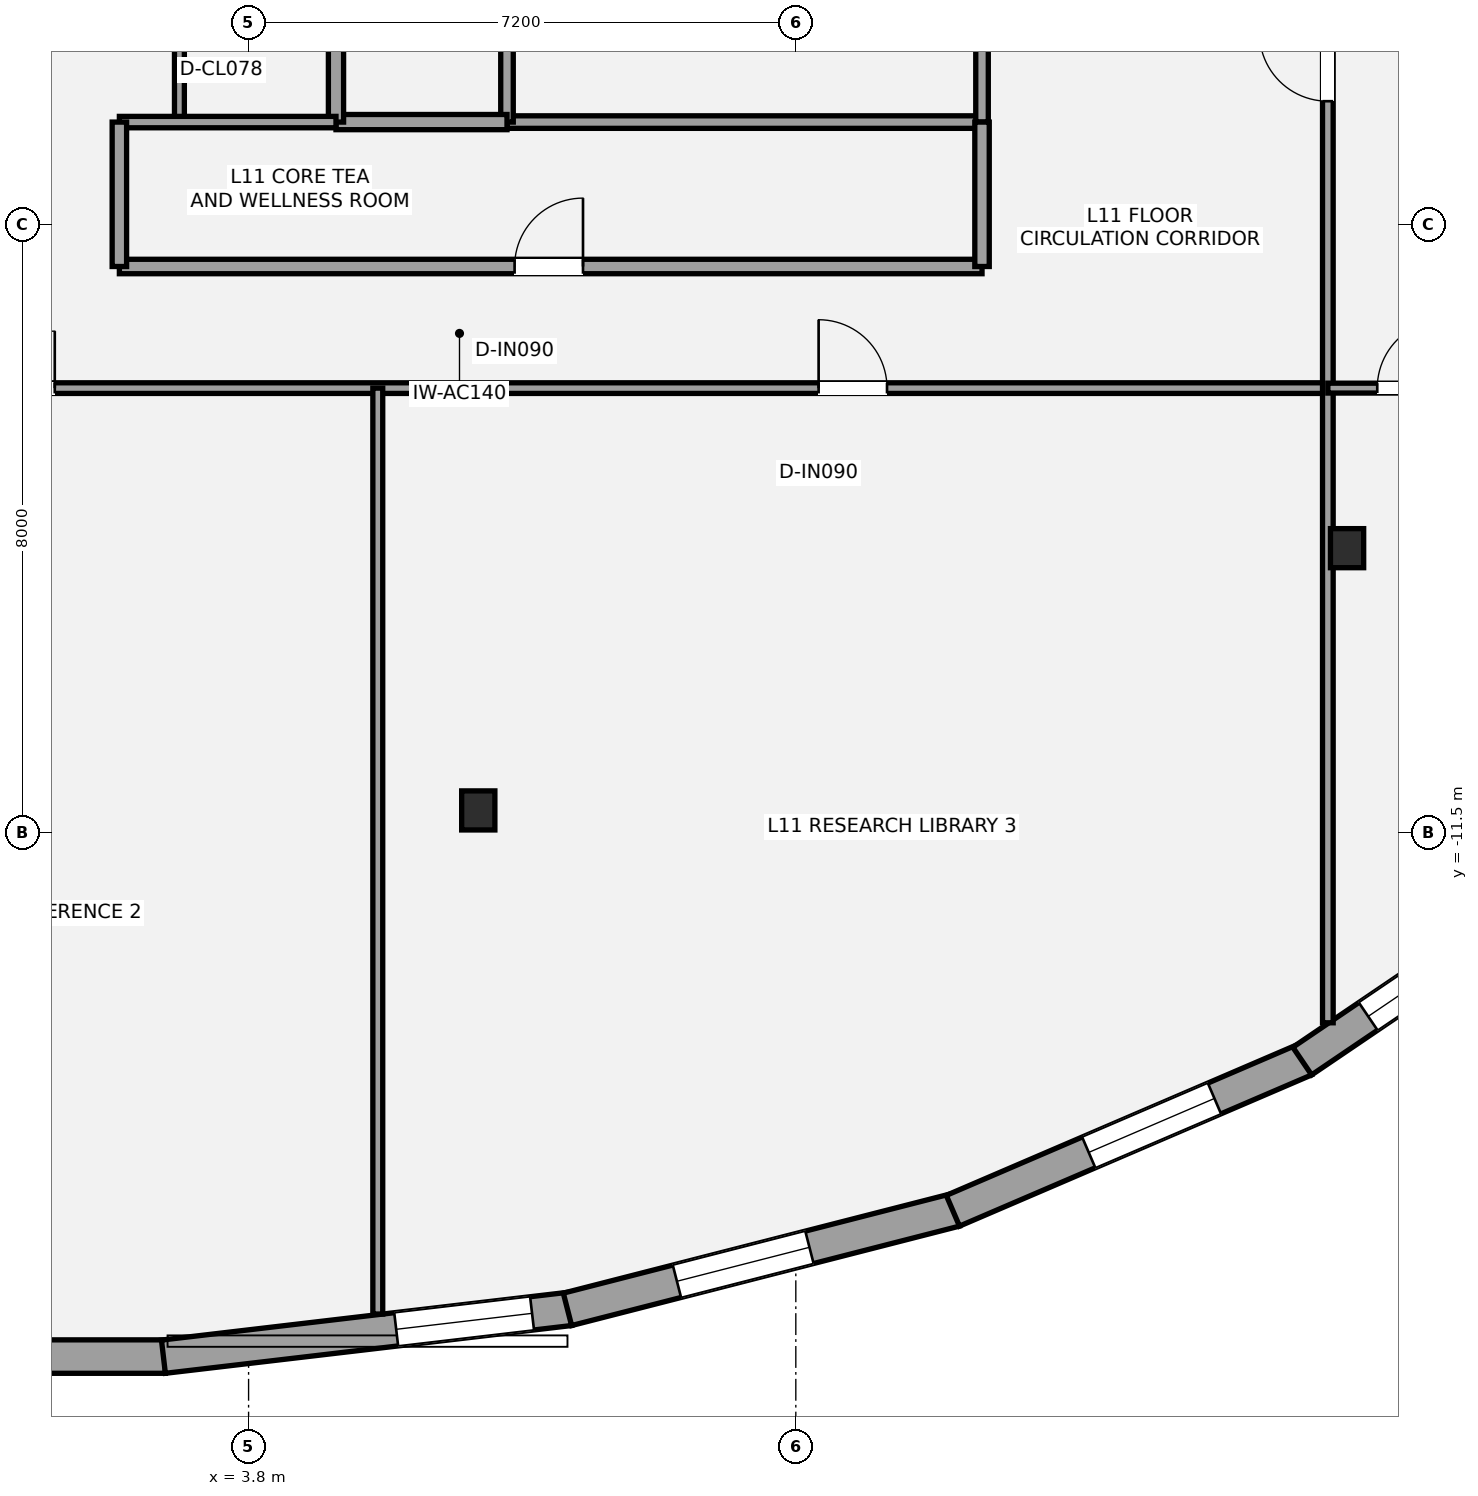
"""IFC4 building model, lengths in metres.
Left out: names, types, materials, properties, quantities, classifications, styles, units other than length and angle.
Written with IfcOpenShell. Run it as: python <this file> out.ifc"""

import sys

from ifc_helpers import new_model, si_unit, direction, frame, frame_2d, origin, origin_2d, place, context, subcontext, project, spatial, rectangle, i_section, extrude, element, fill, save


model = new_model("IFC4")
c1 = context("Model", 3, precision=1e-05, world=origin(), true_north=direction((0.0, 1.0)))
c2 = subcontext(c1, "Body", "Model", "MODEL_VIEW")
j1 = project(units=[si_unit("LENGTHUNIT", "METRE"), si_unit("PLANEANGLEUNIT", "RADIAN")], contexts=[c1])
p1 = place(None, origin())
s1 = spatial("IfcSite", under=j1, at=p1, CompositionType="ELEMENT")
p2 = place(p1, origin())
s2 = spatial("IfcBuilding", under=s1, at=p2, CompositionType="ELEMENT")
p3 = place(p2, frame((0.0, 0.0, 45.0)))
s3 = spatial("IfcBuildingStorey", under=s2, at=p3, CompositionType="ELEMENT", Elevation=45.0)
for number, where, z_axis, x_axis in (
    (1, (6.822, -11.206, 0.0), (0.0, 0.0, 1.0), (1.0, 0.0, 0.0)),
    (2, (18.253, -7.756, 0.0), (0.0, 0.0, 1.0), (1.0, 0.0, 0.0)),
):
    element("IfcColumn", number, at=place(p3, frame(where, z_axis=z_axis, x_axis=x_axis)), inside=s3, PredefinedType="COLUMN", context=c2, shape_type="SweptSolid", body=[
        extrude(i_section(OverallWidth=0.437, OverallDepth=0.514, WebThickness=0.061, FlangeThickness=0.097, at=origin_2d()), origin(), (0.0, 0.0, 1.0), 3.6),
    ])
p4 = place(p3, frame((2.705, -18.391, 0.0), z_axis=(0.0, 0.0, 1.0), x_axis=(-1.0, 0.0, 0.0)))
e3 = element("IfcWall", 3, at=p4, inside=s3, PredefinedType="STANDARD", context=c2, shape_type="SweptSolid", body=[
    extrude(rectangle(XDim=5.41, YDim=0.44, at=frame_2d((2.705, 0.0))), origin(), (0.0, 0.0, 1.0), 2.529),
])
p5 = place(p4, frame((2.028, 0.0, 0.65)))
e4 = element("IfcOpeningElement", 4, at=p5, cuts=e3, PredefinedType="OPENING", context=c2, shape_type="SweptSolid", body=[
    extrude(rectangle(XDim=1.8, YDim=1.7, at=frame_2d((0.9, 0.85))), frame((0.0, 0.23, 0.0), z_axis=(0.0, -1.0, 0.0), x_axis=(1.0, 0.0, 0.0)), (0.0, 0.0, 1.0), 0.46),
])
p6 = place(p3, frame((8.025, -17.764, 0.0), z_axis=(0.0, 0.0, 1.0), x_axis=(-0.993159890371, -0.116762289112, 0.0)))
e5 = element("IfcWall", 5, at=p6, inside=s3, PredefinedType="STANDARD", context=c2, shape_type="SweptSolid", body=[
    extrude(rectangle(XDim=5.382, YDim=0.44, at=frame_2d((2.691, 0.0))), origin(), (0.0, 0.0, 1.0), 2.529),
])
p7 = place(p6, frame((0.498, 0.0, 0.65)))
e6 = element("IfcOpeningElement", 6, at=p7, cuts=e5, PredefinedType="OPENING", context=c2, shape_type="SweptSolid", body=[
    extrude(rectangle(XDim=1.8, YDim=1.7, at=frame_2d((0.9, 0.85))), frame((0.0, 0.23, 0.0), z_axis=(0.0, -1.0, 0.0), x_axis=(1.0, 0.0, 0.0)), (0.0, 0.0, 1.0), 0.46),
])
p8 = place(p3, frame((13.099, -16.462, 0.0), z_axis=(0.0, 0.0, 1.0), x_axis=(-0.968705592422, -0.248212560542, 0.0)))
e7 = element("IfcWall", 7, at=p8, inside=s3, PredefinedType="STANDARD", context=c2, shape_type="SweptSolid", body=[
    extrude(rectangle(XDim=5.268, YDim=0.44, at=frame_2d((2.634, 0.0))), origin(), (0.0, 0.0, 1.0), 2.529),
])
p9 = place(p8, frame((1.981, 0.0, 0.65)))
e8 = element("IfcOpeningElement", 8, at=p9, cuts=e7, PredefinedType="OPENING", context=c2, shape_type="SweptSolid", body=[
    extrude(rectangle(XDim=1.8, YDim=1.7, at=frame_2d((0.9, 0.85))), frame((0.0, 0.23, 0.0), z_axis=(0.0, -1.0, 0.0), x_axis=(1.0, 0.0, 0.0)), (0.0, 0.0, 1.0), 0.46),
])
p10 = place(p3, frame((17.7, -14.483, 0.0), z_axis=(0.0, 0.0, 1.0), x_axis=(-0.918881850071, -0.394532819433, 0.0)))
e9 = element("IfcWall", 9, at=p10, inside=s3, PredefinedType="STANDARD", context=c2, shape_type="SweptSolid", body=[
    extrude(rectangle(XDim=5.042, YDim=0.44, at=frame_2d((2.521, 0.0))), origin(), (0.0, 0.0, 1.0), 2.529),
])
p11 = place(p10, frame((1.297, 0.0, 0.65)))
e10 = element("IfcOpeningElement", 10, at=p11, cuts=e9, PredefinedType="OPENING", context=c2, shape_type="SweptSolid", body=[
    extrude(rectangle(XDim=1.8, YDim=1.7, at=frame_2d((0.9, 0.85))), frame((0.0, 0.23, 0.0), z_axis=(0.0, -1.0, 0.0), x_axis=(1.0, 0.0, 0.0)), (0.0, 0.0, 1.0), 0.46),
])
p12 = place(p3, frame((21.549, -11.87, 0.0), z_axis=(0.0, 0.0, 1.0), x_axis=(-0.827825981515, -0.560984976919, 0.0)))
e11 = element("IfcWall", 11, at=p12, inside=s3, PredefinedType="STANDARD", context=c2, shape_type="SweptSolid", body=[
    extrude(rectangle(XDim=4.695, YDim=0.44, at=frame_2d((2.347, 0.0))), origin(), (0.0, 0.0, 1.0), 2.529),
])
p13 = place(p12, frame((1.846, 0.0, 0.65)))
e12 = element("IfcOpeningElement", 12, at=p13, cuts=e11, PredefinedType="OPENING", context=c2, shape_type="SweptSolid", body=[
    extrude(rectangle(XDim=1.8, YDim=1.7, at=frame_2d((0.9, 0.85))), frame((0.0, 0.23, 0.0), z_axis=(0.0, -1.0, 0.0), x_axis=(1.0, 0.0, 0.0)), (0.0, 0.0, 1.0), 0.46),
])
p14 = place(p3, frame((7.2, -2.15, 0.0), z_axis=(0.0, 0.0, 1.0), x_axis=(1.0, 0.0, 0.0)))
e13 = element("IfcWall", 13, at=p14, inside=s3, PredefinedType="PARTITIONING", context=c2, shape_type="SweptSolid", body=[
    extrude(rectangle(XDim=6.25, YDim=0.165, at=frame_2d((3.125, 0.0))), origin(), (0.0, 0.0, 1.0), 3.4),
])
p15 = place(p3, frame((7.2, -2.15, 0.0), z_axis=(0.0, 0.0, 1.0), x_axis=(0.0, 1.0, 0.0)))
e14 = element("IfcWall", 14, at=p15, inside=s3, PredefinedType="PARTITIONING", context=c2, shape_type="SweptSolid", body=[
    extrude(rectangle(XDim=3.15, YDim=0.165, at=frame_2d((1.575, 0.0))), origin(), (0.0, 0.0, 1.0), 2.853),
])
p16 = place(p3, frame((13.45, -2.15, 0.0), z_axis=(0.0, 0.0, 1.0), x_axis=(0.0, 1.0, 0.0)))
e15 = element("IfcWall", 15, at=p16, inside=s3, PredefinedType="PARTITIONING", context=c2, shape_type="SweptSolid", body=[
    extrude(rectangle(XDim=3.15, YDim=0.165, at=frame_2d((1.575, 0.0))), origin(), (0.0, 0.0, 1.0), 2.853),
])
p17 = place(p16, frame((1.15, 0.0, 0.0)))
e16 = element("IfcOpeningElement", 16, at=p17, cuts=e15, PredefinedType="OPENING", context=c2, shape_type="SweptSolid", body=[
    extrude(rectangle(XDim=1.05, YDim=2.15, at=frame_2d((0.525, 1.075))), frame((0.0, 0.093, 0.0), z_axis=(0.0, -1.0, 0.0), x_axis=(1.0, 0.0, 0.0)), (0.0, 0.0, 1.0), 0.185),
])
p18 = place(p3, frame((4.95, -2.15, 0.0), z_axis=(0.0, 0.0, 1.0), x_axis=(1.0, 0.0, 0.0)))
e17 = element("IfcWall", 17, at=p18, inside=s3, PredefinedType="SOLIDWALL", context=c2, shape_type="SweptSolid", body=[
    extrude(rectangle(XDim=2.25, YDim=0.2, at=frame_2d((1.125, 0.0))), origin(), (0.0, 0.0, 1.0), 3.4),
])
p19 = place(p3, frame((4.95, -2.15, 0.0), z_axis=(0.0, 0.0, 1.0), x_axis=(0.0, 1.0, 0.0)))
e18 = element("IfcWall", 18, at=p19, inside=s3, PredefinedType="SOLIDWALL", context=c2, shape_type="SweptSolid", body=[
    extrude(rectangle(XDim=3.15, YDim=0.2, at=frame_2d((1.575, 0.0))), origin(), (0.0, 0.0, 1.0), 3.4),
])
p20 = place(p19, frame((0.95, 0.0, 0.0)))
e19 = element("IfcOpeningElement", 19, at=p20, cuts=e18, PredefinedType="OPENING", context=c2, shape_type="SweptSolid", body=[
    extrude(rectangle(XDim=0.75, YDim=2.1, at=frame_2d((0.375, 1.05))), frame((0.0, 0.11, 0.0), z_axis=(0.0, -1.0, 0.0), x_axis=(1.0, 0.0, 0.0)), (0.0, 0.0, 1.0), 0.22),
])
p21 = place(p3, frame((2.89, -2.15, 0.0), z_axis=(0.0, 0.0, 1.0), x_axis=(0.0, 1.0, 0.0)))
e20 = element("IfcWall", 20, at=p21, inside=s3, PredefinedType="PARTITIONING", context=c2, shape_type="SweptSolid", body=[
    extrude(rectangle(XDim=1.8, YDim=0.13, at=frame_2d((0.9, 0.0))), origin(), (0.0, 0.0, 1.0), 3.4),
])
p22 = place(p3, frame((2.1, -4.05, 0.0), z_axis=(0.0, 0.0, 1.0), x_axis=(1.0, 0.0, 0.0)))
e21 = element("IfcWall", 21, at=p22, inside=s3, PredefinedType="PLUMBINGWALL", context=c2, shape_type="SweptSolid", body=[
    extrude(rectangle(XDim=11.35, YDim=0.19, at=frame_2d((5.675, 0.0))), origin(), (0.0, 0.0, 1.0), 2.933),
])
p23 = place(p22, frame((5.2, 0.0, 0.0)))
e22 = element("IfcOpeningElement", 22, at=p23, cuts=e21, PredefinedType="OPENING", context=c2, shape_type="SweptSolid", body=[
    extrude(rectangle(XDim=0.9, YDim=2.1, at=frame_2d((0.45, 1.05))), frame((0.0, 0.105, 0.0), z_axis=(0.0, -1.0, 0.0), x_axis=(1.0, 0.0, 0.0)), (0.0, 0.0, 1.0), 0.21),
])
p24 = place(p3, frame((2.1, -2.15, 0.0), z_axis=(0.0, 0.0, 1.0), x_axis=(1.0, 0.0, 0.0)))
e23 = element("IfcWall", 23, at=p24, inside=s3, PredefinedType="PLUMBINGWALL", context=c2, shape_type="SweptSolid", body=[
    extrude(rectangle(XDim=2.85, YDim=0.15, at=frame_2d((1.425, 0.0))), origin(), (0.0, 0.0, 1.0), 3.4),
])
p25 = place(p3, frame((2.1, -4.05, 0.0), z_axis=(0.0, 0.0, 1.0), x_axis=(0.0, 1.0, 0.0)))
e24 = element("IfcWall", 24, at=p25, inside=s3, PredefinedType="PLUMBINGWALL", context=c2, shape_type="SweptSolid", body=[
    extrude(rectangle(XDim=1.9, YDim=0.19, at=frame_2d((0.95, 0.0))), origin(), (0.0, 0.0, 1.0), 3.4),
])
p26 = place(p3, frame((13.45, -4.05, 0.0), z_axis=(0.0, 0.0, 1.0), x_axis=(0.0, 1.0, 0.0)))
e25 = element("IfcWall", 25, at=p26, inside=s3, PredefinedType="PLUMBINGWALL", context=c2, shape_type="SweptSolid", body=[
    extrude(rectangle(XDim=1.9, YDim=0.19, at=frame_2d((0.95, 0.0))), origin(), (0.0, 0.0, 1.0), 2.853),
])
p27 = place(p3, frame((-16.1, -5.65, 0.0), z_axis=(0.0, 0.0, 1.0), x_axis=(1.0, 0.0, 0.0)))
e26 = element("IfcWall", 26, at=p27, inside=s3, PredefinedType="PARTITIONING", context=c2, shape_type="SweptSolid", body=[
    extrude(rectangle(XDim=34.1, YDim=0.14, at=frame_2d((17.05, 0.0))), origin(), (0.0, 0.0, 1.0), 2.853),
])
p28 = place(p27, frame((5.35, 0.0, 0.0)))
e27 = element("IfcOpeningElement", 27, at=p28, cuts=e26, PredefinedType="OPENING", context=c2, shape_type="SweptSolid", body=[
    extrude(rectangle(XDim=0.9, YDim=2.1, at=frame_2d((0.45, 1.05))), frame((0.0, 0.08, 0.0), z_axis=(0.0, -1.0, 0.0), x_axis=(1.0, 0.0, 0.0)), (0.0, 0.0, 1.0), 0.16),
])
p29 = place(p27, frame((15.85, 0.0, 0.0)))
e28 = element("IfcOpeningElement", 28, at=p29, cuts=e26, PredefinedType="OPENING", context=c2, shape_type="SweptSolid", body=[
    extrude(rectangle(XDim=1.5, YDim=2.15, at=frame_2d((0.75, 1.075))), frame((0.0, 0.08, 0.0), z_axis=(0.0, -1.0, 0.0), x_axis=(1.0, 0.0, 0.0)), (0.0, 0.0, 1.0), 0.16),
])
p30 = place(p27, frame((27.4, 0.0, 0.0)))
e29 = element("IfcOpeningElement", 29, at=p30, cuts=e26, PredefinedType="OPENING", context=c2, shape_type="SweptSolid", body=[
    extrude(rectangle(XDim=0.9, YDim=2.1, at=frame_2d((0.45, 1.05))), frame((0.0, 0.08, 0.0), z_axis=(0.0, -1.0, 0.0), x_axis=(1.0, 0.0, 0.0)), (0.0, 0.0, 1.0), 0.16),
])
p31 = place(p3, frame((18.0, -14.0, 0.0), z_axis=(0.0, 0.0, 1.0), x_axis=(0.0, 1.0, 0.0)))
e30 = element("IfcWall", 30, at=p31, inside=s3, PredefinedType="PARTITIONING", context=c2, shape_type="SweptSolid", body=[
    extrude(rectangle(XDim=19.85, YDim=0.14, at=frame_2d((9.925, 0.0))), origin(), (0.0, 0.0, 1.0), 2.841),
])
p32 = place(p31, frame((12.125, 0.0, 0.0)))
e31 = element("IfcOpeningElement", 31, at=p32, cuts=e30, PredefinedType="OPENING", context=c2, shape_type="SweptSolid", body=[
    extrude(rectangle(XDim=0.9, YDim=2.1, at=frame_2d((0.45, 1.05))), frame((0.0, 0.08, 0.0), z_axis=(0.0, -1.0, 0.0), x_axis=(1.0, 0.0, 0.0)), (0.0, 0.0, 1.0), 0.16),
])
p33 = place(p31, frame((17.875, 0.0, 0.0)))
e32 = element("IfcOpeningElement", 32, at=p33, cuts=e30, PredefinedType="OPENING", context=c2, shape_type="SweptSolid", body=[
    extrude(rectangle(XDim=0.9, YDim=2.1, at=frame_2d((0.45, 1.05))), frame((0.0, 0.08, 0.0), z_axis=(0.0, -1.0, 0.0), x_axis=(1.0, 0.0, 0.0)), (0.0, 0.0, 1.0), 0.16),
])
p34 = place(p3, frame((5.5, -17.832, 0.0), z_axis=(0.0, 0.0, 1.0), x_axis=(0.0, 1.0, 0.0)))
e33 = element("IfcWall", 33, at=p34, inside=s3, PredefinedType="PARTITIONING", context=c2, shape_type="SweptSolid", body=[
    extrude(rectangle(XDim=12.182, YDim=0.13, at=frame_2d((6.091, 0.0))), origin(), (0.0, 0.0, 1.0), 3.4),
])
p35 = place(p3, frame((18.0, -5.65, 0.0), z_axis=(0.0, 0.0, 1.0), x_axis=(1.0, 0.0, 0.0)))
e34 = element("IfcWall", 34, at=p35, inside=s3, PredefinedType="PARTITIONING", context=c2, shape_type="SweptSolid", body=[
    extrude(rectangle(XDim=7.917, YDim=0.13, at=frame_2d((3.958, 0.0))), origin(), (0.0, 0.0, 1.0), 2.779),
])
p36 = place(p35, frame((0.65, 0.0, 0.0)))
e35 = element("IfcOpeningElement", 35, at=p36, cuts=e34, PredefinedType="OPENING", context=c2, shape_type="SweptSolid", body=[
    extrude(rectangle(XDim=0.9, YDim=2.1, at=frame_2d((0.45, 1.05))), frame((0.0, 0.075, 0.0), z_axis=(0.0, -1.0, 0.0), x_axis=(1.0, 0.0, 0.0)), (0.0, 0.0, 1.0), 0.15),
])
p37 = place(p7, origin())
e36 = element("IfcWindow", 36, at=p37, inside=s3, PartitioningType="SINGLE_PANEL", PredefinedType="WINDOW", context=c2, shape_type="SweptSolid", body=[
    extrude(rectangle(XDim=1.8, YDim=1.7, at=frame_2d((0.9, 0.85))), frame((0.0, -0.01, 0.0), z_axis=(0.0, -1.0, 0.0), x_axis=(1.0, 0.0, 0.0)), (0.0, 0.0, 1.0), 0.06),
])
fill(e6, e36)
p38 = place(p9, origin())
e37 = element("IfcWindow", 37, at=p38, inside=s3, PartitioningType="SINGLE_PANEL", PredefinedType="WINDOW", context=c2, shape_type="SweptSolid", body=[
    extrude(rectangle(XDim=1.8, YDim=1.7, at=frame_2d((0.9, 0.85))), frame((0.0, -0.01, 0.0), z_axis=(0.0, -1.0, 0.0), x_axis=(1.0, 0.0, 0.0)), (0.0, 0.0, 1.0), 0.06),
])
fill(e8, e37)
p39 = place(p11, origin())
e38 = element("IfcWindow", 38, at=p39, inside=s3, PartitioningType="SINGLE_PANEL", PredefinedType="WINDOW", context=c2, shape_type="SweptSolid", body=[
    extrude(rectangle(XDim=1.8, YDim=1.7, at=frame_2d((0.9, 0.85))), frame((0.0, -0.01, 0.0), z_axis=(0.0, -1.0, 0.0), x_axis=(1.0, 0.0, 0.0)), (0.0, 0.0, 1.0), 0.06),
])
fill(e10, e38)
p40 = place(p13, origin())
e39 = element("IfcWindow", 39, at=p40, inside=s3, PartitioningType="SINGLE_PANEL", PredefinedType="WINDOW", context=c2, shape_type="SweptSolid", body=[
    extrude(rectangle(XDim=1.8, YDim=1.7, at=frame_2d((0.9, 0.85))), frame((0.0, -0.01, 0.0), z_axis=(0.0, -1.0, 0.0), x_axis=(1.0, 0.0, 0.0)), (0.0, 0.0, 1.0), 0.06),
])
fill(e12, e39)
p41 = place(p23, origin())
e40 = element("IfcDoor", 40, at=p41, inside=s3, OperationType="SINGLE_SWING_RIGHT", PredefinedType="DOOR", context=c2, shape_type="SweptSolid", body=[
    extrude(rectangle(XDim=0.9, YDim=2.1, at=frame_2d((0.45, 1.05))), frame((0.0, 0.025, 0.0), z_axis=(0.0, -1.0, 0.0), x_axis=(1.0, 0.0, 0.0)), (0.0, 0.0, 1.0), 0.05),
])
fill(e22, e40)
p42 = place(p29, origin())
e41 = element("IfcDoor", 41, at=p42, inside=s3, OperationType="DOUBLE_DOOR_SINGLE_SWING", PredefinedType="DOOR", context=c2, shape_type="SweptSolid", body=[
    extrude(rectangle(XDim=1.5, YDim=2.15, at=frame_2d((0.75, 1.075))), frame((0.0, 0.025, 0.0), z_axis=(0.0, -1.0, 0.0), x_axis=(1.0, 0.0, 0.0)), (0.0, 0.0, 1.0), 0.05),
])
fill(e28, e41)
p43 = place(p30, origin())
e42 = element("IfcDoor", 42, at=p43, inside=s3, OperationType="SINGLE_SWING_LEFT", PredefinedType="DOOR", context=c2, shape_type="SweptSolid", body=[
    extrude(rectangle(XDim=0.9, YDim=2.1, at=frame_2d((0.45, 1.05))), frame((0.0, 0.025, 0.0), z_axis=(0.0, -1.0, 0.0), x_axis=(1.0, 0.0, 0.0)), (0.0, 0.0, 1.0), 0.05),
])
fill(e29, e42)
p44 = place(p36, origin())
e43 = element("IfcDoor", 43, at=p44, inside=s3, OperationType="SINGLE_SWING_RIGHT", PredefinedType="DOOR", context=c2, shape_type="SweptSolid", body=[
    extrude(rectangle(XDim=0.9, YDim=2.1, at=frame_2d((0.45, 1.05))), frame((0.0, 0.025, 0.0), z_axis=(0.0, -1.0, 0.0), x_axis=(1.0, 0.0, 0.0)), (0.0, 0.0, 1.0), 0.05),
])
fill(e35, e43)
p45 = place(p32, origin())
e44 = element("IfcDoor", 44, at=p45, inside=s3, OperationType="SINGLE_SWING_RIGHT", PredefinedType="DOOR", context=c2, shape_type="SweptSolid", body=[
    extrude(rectangle(XDim=0.9, YDim=2.1, at=frame_2d((0.45, 1.05))), frame((0.0, 0.025, 0.0), z_axis=(0.0, -1.0, 0.0), x_axis=(1.0, 0.0, 0.0)), (0.0, 0.0, 1.0), 0.05),
])
fill(e31, e44)
save(model, sys.argv[1])
